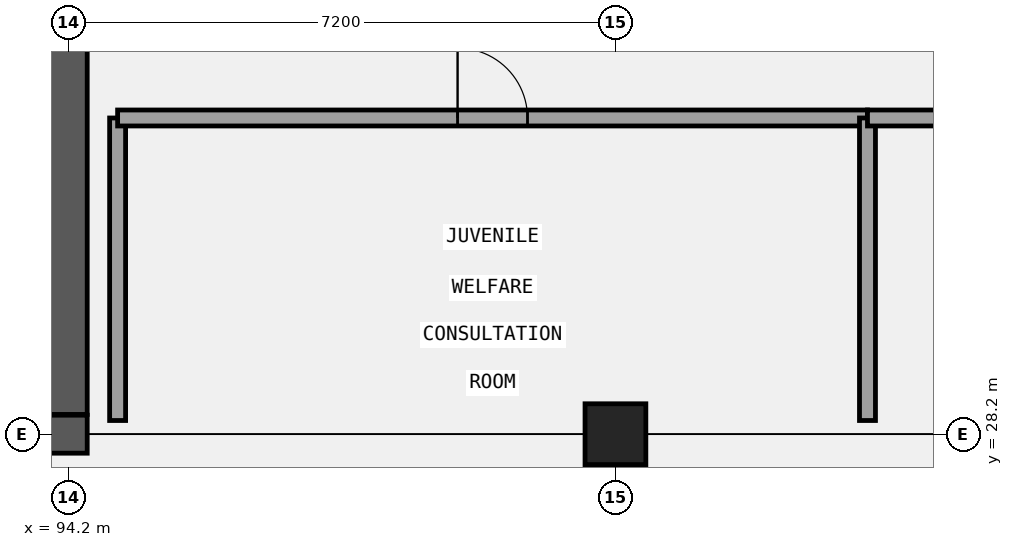
"""IFC4 building model, lengths in metres.
Left out: names, types, materials, properties, quantities, classifications, styles, units other than length and angle.
Written with IfcOpenShell. Run it as: python <this file> out.ifc"""

import sys

from ifc_helpers import new_model, si_unit, direction, frame, frame_2d, origin, origin_2d, place, context, subcontext, project, spatial, rectangle, extrude, element, fill, save


model = new_model("IFC4")
c1 = context("Model", 3, precision=1e-05, world=origin(), true_north=direction((0.0, 1.0)))
c2 = subcontext(c1, "Body", "Model", "MODEL_VIEW")
j1 = project(units=[si_unit("LENGTHUNIT", "METRE"), si_unit("PLANEANGLEUNIT", "RADIAN")], contexts=[c1])
p1 = place(None, origin())
s1 = spatial("IfcSite", under=j1, at=p1, CompositionType="ELEMENT")
p2 = place(p1, origin())
s2 = spatial("IfcBuilding", under=s1, at=p2, CompositionType="ELEMENT")
p3 = place(p2, frame((0.0, 0.0, 5.4)))
s3 = spatial("IfcBuildingStorey", under=s2, at=p3, CompositionType="ELEMENT", Elevation=5.4)
p4 = place(p3, frame((79.55, 28.2, 0.0), z_axis=(0.0, 0.0, 1.0), x_axis=(1.0, 0.0, 0.0)))
e1 = element("IfcWall", 1, at=p4, inside=s3, PredefinedType="SHEAR", context=c2, shape_type="SweptSolid", body=[
    extrude(rectangle(XDim=14.9, YDim=0.5, at=frame_2d((7.45, 0.0))), origin(), (0.0, 0.0, 1.0), 4.2),
])
p5 = place(p4, frame((3.8, 0.0, 0.0)))
e2 = element("IfcOpeningElement", 2, at=p5, cuts=e1, PredefinedType="OPENING", context=c2, shape_type="SweptSolid", body=[
    extrude(rectangle(XDim=1.3, YDim=2.2, at=frame_2d((0.65, 1.1))), frame((0.0, 0.26, 0.0), z_axis=(0.0, -1.0, 0.0), x_axis=(1.0, 0.0, 0.0)), (0.0, 0.0, 1.0), 0.52),
])
p6 = place(p3, frame((94.2, 28.46, 0.0), z_axis=(0.0, 0.0, 1.0), x_axis=(0.0, 1.0, 0.0)))
e3 = element("IfcWall", 3, at=p6, inside=s3, PredefinedType="SHEAR", context=c2, shape_type="SweptSolid", body=[
    extrude(rectangle(XDim=6.68, YDim=0.5, at=frame_2d((3.34, 0.0))), origin(), (0.0, 0.0, 1.0), 4.2),
])
p7 = place(p3, frame((101.4, 28.2, 0.0), z_axis=(0.0, 0.0, 1.0), x_axis=(1.0, 0.0, 0.0)))
e4 = element("IfcColumn", 4, at=p7, inside=s3, PredefinedType="COLUMN", context=c2, shape_type="SweptSolid", body=[
    extrude(rectangle(XDim=0.8, YDim=0.8, at=origin_2d()), origin(), (0.0, 0.0, 1.0), 4.2),
])
p8 = place(p3, frame((94.85, 28.38, 0.0), z_axis=(0.0, 0.0, 1.0), x_axis=(0.0, 1.0, 0.0)))
e5 = element("IfcWall", 5, at=p8, inside=s3, PredefinedType="PARTITIONING", context=c2, shape_type="SweptSolid", body=[
    extrude(rectangle(XDim=3.98, YDim=0.21, at=frame_2d((1.99, 0.0))), origin(), (0.0, 0.0, 1.0), 3.92),
])
p9 = place(p3, frame((94.85, 32.36, 0.0), z_axis=(0.0, 0.0, 1.0), x_axis=(1.0, 0.0, 0.0)))
e6 = element("IfcWall", 6, at=p9, inside=s3, PredefinedType="PARTITIONING", context=c2, shape_type="SweptSolid", body=[
    extrude(rectangle(XDim=9.866, YDim=0.21, at=frame_2d((4.933, 0.0))), origin(), (0.0, 0.0, 1.0), 3.92),
])
p10 = place(p9, frame((4.473, 0.0, 0.0)))
e7 = element("IfcOpeningElement", 7, at=p10, cuts=e6, PredefinedType="OPENING", context=c2, shape_type="SweptSolid", body=[
    extrude(rectangle(XDim=0.92, YDim=2.22, at=frame_2d((0.46, 1.11))), frame((0.0, 0.115, 0.0), z_axis=(0.0, -1.0, 0.0), x_axis=(1.0, 0.0, 0.0)), (0.0, 0.0, 1.0), 0.23),
])
p11 = place(p3, frame((104.716, 28.38, 0.0), z_axis=(0.0, 0.0, 1.0), x_axis=(0.0, 1.0, 0.0)))
e8 = element("IfcWall", 8, at=p11, inside=s3, PredefinedType="PARTITIONING", context=c2, shape_type="SweptSolid", body=[
    extrude(rectangle(XDim=3.98, YDim=0.21, at=frame_2d((1.99, 0.0))), origin(), (0.0, 0.0, 1.0), 3.92),
])
p12 = place(p3, frame((104.716, 32.36, 0.0), z_axis=(0.0, 0.0, 1.0), x_axis=(1.0, 0.0, 0.0)))
e9 = element("IfcWall", 9, at=p12, inside=s3, PredefinedType="PARTITIONING", context=c2, shape_type="SweptSolid", body=[
    extrude(rectangle(XDim=9.866, YDim=0.21, at=frame_2d((4.933, 0.0))), origin(), (0.0, 0.0, 1.0), 3.92),
])
p13 = place(p12, frame((4.473, 0.0, 0.0)))
e10 = element("IfcOpeningElement", 10, at=p13, cuts=e9, PredefinedType="OPENING", context=c2, shape_type="SweptSolid", body=[
    extrude(rectangle(XDim=0.92, YDim=2.35, at=frame_2d((0.46, 1.175))), frame((0.0, 0.115, 0.0), z_axis=(0.0, -1.0, 0.0), x_axis=(1.0, 0.0, 0.0)), (0.0, 0.0, 1.0), 0.23),
])
p14 = place(p10, frame((0.92, 0.0, 0.0), z_axis=(0.0, 0.0, 1.0), x_axis=(-1.0, 0.0, 0.0)))
e11 = element("IfcDoor", 11, at=p14, inside=s3, OperationType="SINGLE_SWING_LEFT", PredefinedType="DOOR", context=c2, shape_type="SweptSolid", body=[
    extrude(rectangle(XDim=0.92, YDim=2.22, at=frame_2d((0.46, 1.11))), frame((0.0, 0.025, 0.0), z_axis=(0.0, -1.0, 0.0), x_axis=(1.0, 0.0, 0.0)), (0.0, 0.0, 1.0), 0.05),
])
fill(e7, e11)
save(model, sys.argv[1])
